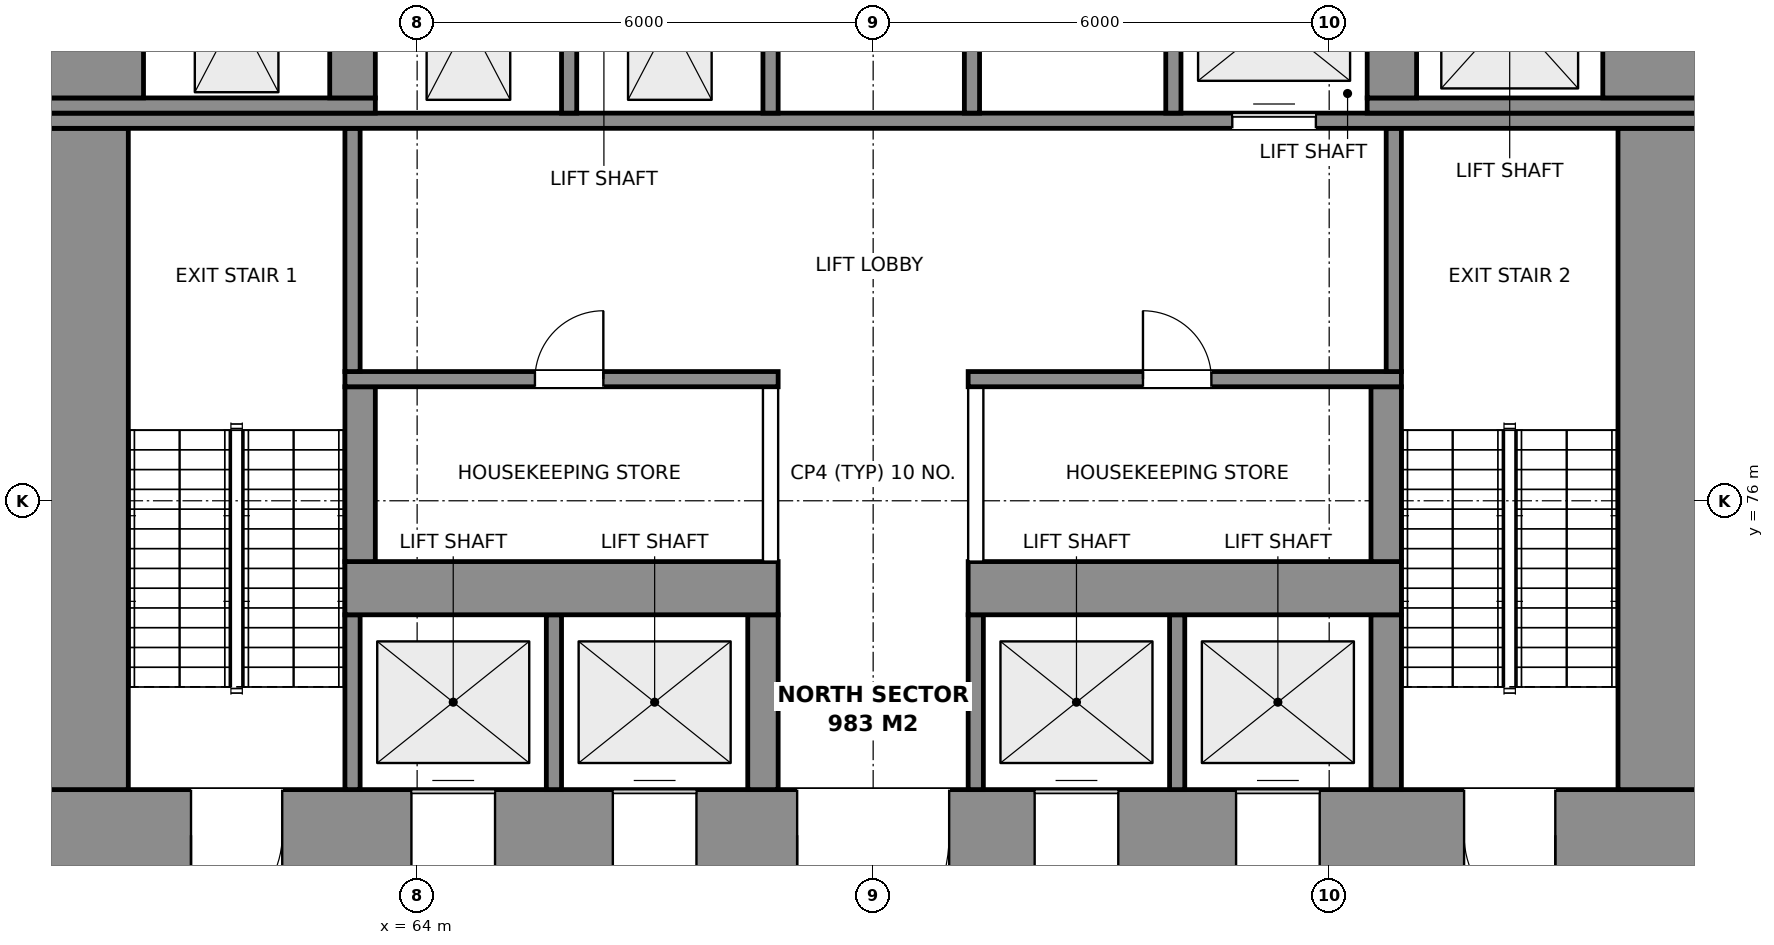
"""IFC4 building model, lengths in metres.
Left out: names, types, materials, properties, quantities, classifications, styles, units other than length and angle.
Written with IfcOpenShell. Run it as: python <this file> out.ifc"""

import sys

from ifc_helpers import new_model, si_unit, direction, frame, frame_2d, origin, place, context, subcontext, project, spatial, rectangle, extrude, element, fill, save


model = new_model("IFC4")
c1 = context("Model", 3, precision=1e-05, world=origin(), true_north=direction((0.0, 1.0)))
c2 = subcontext(c1, "Body", "Model", "MODEL_VIEW")
j1 = project(units=[si_unit("LENGTHUNIT", "METRE"), si_unit("PLANEANGLEUNIT", "RADIAN")], contexts=[c1])
p1 = place(None, origin())
s1 = spatial("IfcSite", under=j1, at=p1, CompositionType="ELEMENT")
p2 = place(p1, origin())
s2 = spatial("IfcBuilding", under=s1, at=p2, CompositionType="ELEMENT")
p3 = place(p2, frame((0.0, 0.0, 85.8)))
s3 = spatial("IfcBuildingStorey", under=s2, at=p3, CompositionType="ELEMENT", Elevation=85.8)
p4 = place(p3, frame((59.0, 71.6, 0.0), z_axis=(0.0, 0.0, 1.0), x_axis=(1.0, 0.0, 0.0)))
e1 = element("IfcWall", 1, at=p4, inside=s3, PredefinedType="SHEAR", context=c2, shape_type="SweptSolid", body=[
    extrude(rectangle(XDim=22.0, YDim=1.2, at=frame_2d((11.0, 0.0))), origin(), (0.0, 0.0, 1.0), 5.0),
])
p5 = place(p4, frame((2.025, 0.0, 0.0)))
e2 = element("IfcOpeningElement", 2, at=p5, cuts=e1, PredefinedType="OPENING", context=c2, shape_type="SweptSolid", body=[
    extrude(rectangle(XDim=1.2, YDim=2.1, at=frame_2d((0.6, 1.05))), frame((0.0, 0.61, 0.0), z_axis=(0.0, -1.0, 0.0), x_axis=(1.0, 0.0, 0.0)), (0.0, 0.0, 1.0), 1.22),
])
p6 = place(p4, frame((18.775, 0.0, 0.0)))
e3 = element("IfcOpeningElement", 3, at=p6, cuts=e1, PredefinedType="OPENING", context=c2, shape_type="SweptSolid", body=[
    extrude(rectangle(XDim=1.2, YDim=2.1, at=frame_2d((0.6, 1.05))), frame((0.0, 0.61, 0.0), z_axis=(0.0, -1.0, 0.0), x_axis=(1.0, 0.0, 0.0)), (0.0, 0.0, 1.0), 1.22),
])
p7 = place(p4, frame((10.0, 0.0, 0.0)))
e4 = element("IfcOpeningElement", 4, at=p7, cuts=e1, PredefinedType="OPENING", context=c2, shape_type="SweptSolid", body=[
    extrude(rectangle(XDim=2.0, YDim=2.1, at=frame_2d((1.0, 1.05))), frame((0.0, 0.61, 0.0), z_axis=(0.0, -1.0, 0.0), x_axis=(1.0, 0.0, 0.0)), (0.0, 0.0, 1.0), 1.22),
])
p8 = place(p4, frame((4.925, 0.0, 0.0)))
e5 = element("IfcOpeningElement", 5, at=p8, cuts=e1, PredefinedType="OPENING", context=c2, shape_type="SweptSolid", body=[
    extrude(rectangle(XDim=1.1, YDim=2.1, at=frame_2d((0.55, 1.05))), frame((0.0, 0.61, 0.0), z_axis=(0.0, -1.0, 0.0), x_axis=(1.0, 0.0, 0.0)), (0.0, 0.0, 1.0), 1.22),
])
p9 = place(p4, frame((7.575, 0.0, 0.0)))
e6 = element("IfcOpeningElement", 6, at=p9, cuts=e1, PredefinedType="OPENING", context=c2, shape_type="SweptSolid", body=[
    extrude(rectangle(XDim=1.1, YDim=2.1, at=frame_2d((0.55, 1.05))), frame((0.0, 0.61, 0.0), z_axis=(0.0, -1.0, 0.0), x_axis=(1.0, 0.0, 0.0)), (0.0, 0.0, 1.0), 1.22),
])
p10 = place(p4, frame((13.125, 0.0, 0.0)))
e7 = element("IfcOpeningElement", 7, at=p10, cuts=e1, PredefinedType="OPENING", context=c2, shape_type="SweptSolid", body=[
    extrude(rectangle(XDim=1.1, YDim=2.1, at=frame_2d((0.55, 1.05))), frame((0.0, 0.61, 0.0), z_axis=(0.0, -1.0, 0.0), x_axis=(1.0, 0.0, 0.0)), (0.0, 0.0, 1.0), 1.22),
])
p11 = place(p4, frame((15.775, 0.0, 0.0)))
e8 = element("IfcOpeningElement", 8, at=p11, cuts=e1, PredefinedType="OPENING", context=c2, shape_type="SweptSolid", body=[
    extrude(rectangle(XDim=1.1, YDim=2.1, at=frame_2d((0.55, 1.05))), frame((0.0, 0.61, 0.0), z_axis=(0.0, -1.0, 0.0), x_axis=(1.0, 0.0, 0.0)), (0.0, 0.0, 1.0), 1.22),
])
p12 = place(p3, frame((59.6, 72.2, 0.0), z_axis=(0.0, 0.0, 1.0), x_axis=(0.0, 1.0, 0.0)))
e9 = element("IfcWall", 9, at=p12, inside=s3, PredefinedType="SHEAR", context=c2, shape_type="SweptSolid", body=[
    extrude(rectangle(XDim=8.7, YDim=1.2, at=frame_2d((4.35, 0.0))), origin(), (0.0, 0.0, 1.0), 5.0),
])
for number, where, z_axis, x_axis in (
    (10, (63.15, 72.2, 0.0), (0.0, 0.0, 1.0), (0.0, 1.0, 0.0)),
    (11, (65.8, 72.2, 0.0), (0.0, 0.0, 1.0), (0.0, 1.0, 0.0)),
):
    element("IfcWall", number, at=place(p3, frame(where, z_axis=z_axis, x_axis=x_axis)), inside=s3, PredefinedType="SHEAR", context=c2, shape_type="SweptSolid", body=[
        extrude(rectangle(XDim=2.3, YDim=0.2, at=frame_2d((1.15, 0.0))), origin(), (0.0, 0.0, 1.0), 5.0),
    ])
p13 = place(p3, frame((68.55, 72.2, 0.0), z_axis=(0.0, 0.0, 1.0), x_axis=(0.0, 1.0, 0.0)))
e12 = element("IfcWall", 12, at=p13, inside=s3, PredefinedType="SHEAR", context=c2, shape_type="SweptSolid", body=[
    extrude(rectangle(XDim=2.3, YDim=0.4, at=frame_2d((1.15, 0.0))), origin(), (0.0, 0.0, 1.0), 5.0),
])
for number, where, z_axis, x_axis in (
    (13, (71.35, 72.2, 0.0), (0.0, 0.0, 1.0), (0.0, 1.0, 0.0)),
    (14, (74.0, 72.2, 0.0), (0.0, 0.0, 1.0), (0.0, 1.0, 0.0)),
):
    element("IfcWall", number, at=place(p3, frame(where, z_axis=z_axis, x_axis=x_axis)), inside=s3, PredefinedType="SHEAR", context=c2, shape_type="SweptSolid", body=[
        extrude(rectangle(XDim=2.3, YDim=0.2, at=frame_2d((1.15, 0.0))), origin(), (0.0, 0.0, 1.0), 5.0),
    ])
p14 = place(p3, frame((76.75, 72.2, 0.0), z_axis=(0.0, 0.0, 1.0), x_axis=(0.0, 1.0, 0.0)))
e15 = element("IfcWall", 15, at=p14, inside=s3, PredefinedType="SHEAR", context=c2, shape_type="SweptSolid", body=[
    extrude(rectangle(XDim=2.3, YDim=0.4, at=frame_2d((1.15, 0.0))), origin(), (0.0, 0.0, 1.0), 5.0),
])
p15 = place(p3, frame((80.4, 72.2, 0.0), z_axis=(0.0, 0.0, 1.0), x_axis=(0.0, 1.0, 0.0)))
e16 = element("IfcWall", 16, at=p15, inside=s3, PredefinedType="SHEAR", context=c2, shape_type="SweptSolid", body=[
    extrude(rectangle(XDim=8.7, YDim=1.2, at=frame_2d((4.35, 0.0))), origin(), (0.0, 0.0, 1.0), 5.0),
])
for number, where, z_axis, x_axis in (
    (17, (63.05, 74.85, 0.0), (0.0, 0.0, 1.0), (1.0, 0.0, 0.0)),
    (18, (71.25, 74.85, 0.0), (0.0, 0.0, 1.0), (1.0, 0.0, 0.0)),
):
    element("IfcWall", number, at=place(p3, frame(where, z_axis=z_axis, x_axis=x_axis)), inside=s3, PredefinedType="SHEAR", context=c2, shape_type="SweptSolid", body=[
        extrude(rectangle(XDim=5.7, YDim=0.7, at=frame_2d((2.85, 0.0))), origin(), (0.0, 0.0, 1.0), 5.0),
    ])
p16 = place(p3, frame((63.25, 75.2, 0.0), z_axis=(0.0, 0.0, 1.0), x_axis=(0.0, 1.0, 0.0)))
e19 = element("IfcWall", 19, at=p16, inside=s3, PredefinedType="SHEAR", context=c2, shape_type="SweptSolid", body=[
    extrude(rectangle(XDim=2.3, YDim=0.4, at=frame_2d((1.15, 0.0))), origin(), (0.0, 0.0, 1.0), 5.0),
])
for number, where, z_axis, x_axis in (
    (20, (68.65, 75.2, 0.0), (0.0, 0.0, 1.0), (0.0, 1.0, 0.0)),
    (21, (71.35, 75.2, 0.0), (0.0, 0.0, 1.0), (0.0, 1.0, 0.0)),
):
    element("IfcWall", number, at=place(p3, frame(where, z_axis=z_axis, x_axis=x_axis)), inside=s3, PredefinedType="PARTITIONING", context=c2, shape_type="SweptSolid", body=[
        extrude(rectangle(XDim=2.3, YDim=0.2, at=frame_2d((1.15, 0.0))), origin(), (0.0, 0.0, 1.0), 4.7),
    ])
p17 = place(p3, frame((76.75, 75.2, 0.0), z_axis=(0.0, 0.0, 1.0), x_axis=(0.0, 1.0, 0.0)))
e22 = element("IfcWall", 22, at=p17, inside=s3, PredefinedType="SHEAR", context=c2, shape_type="SweptSolid", body=[
    extrude(rectangle(XDim=2.3, YDim=0.4, at=frame_2d((1.15, 0.0))), origin(), (0.0, 0.0, 1.0), 5.0),
])
p18 = place(p3, frame((63.05, 77.6, 0.0), z_axis=(0.0, 0.0, 1.0), x_axis=(1.0, 0.0, 0.0)))
e23 = element("IfcWall", 23, at=p18, inside=s3, PredefinedType="SHEAR", context=c2, shape_type="SweptSolid", body=[
    extrude(rectangle(XDim=5.7, YDim=0.2, at=frame_2d((2.85, 0.0))), origin(), (0.0, 0.0, 1.0), 5.0),
])
p19 = place(p18, frame((2.5, 0.0, 0.0)))
e24 = element("IfcOpeningElement", 24, at=p19, cuts=e23, PredefinedType="OPENING", context=c2, shape_type="SweptSolid", body=[
    extrude(rectangle(XDim=0.9, YDim=2.1, at=frame_2d((0.45, 1.05))), frame((0.0, 0.11, 0.0), z_axis=(0.0, -1.0, 0.0), x_axis=(1.0, 0.0, 0.0)), (0.0, 0.0, 1.0), 0.22),
])
p20 = place(p3, frame((71.25, 77.6, 0.0), z_axis=(0.0, 0.0, 1.0), x_axis=(1.0, 0.0, 0.0)))
e25 = element("IfcWall", 25, at=p20, inside=s3, PredefinedType="SHEAR", context=c2, shape_type="SweptSolid", body=[
    extrude(rectangle(XDim=5.7, YDim=0.2, at=frame_2d((2.85, 0.0))), origin(), (0.0, 0.0, 1.0), 5.0),
])
p21 = place(p20, frame((2.3, 0.0, 0.0)))
e26 = element("IfcOpeningElement", 26, at=p21, cuts=e25, PredefinedType="OPENING", context=c2, shape_type="SweptSolid", body=[
    extrude(rectangle(XDim=0.9, YDim=2.1, at=frame_2d((0.45, 1.05))), frame((0.0, 0.11, 0.0), z_axis=(0.0, -1.0, 0.0), x_axis=(1.0, 0.0, 0.0)), (0.0, 0.0, 1.0), 0.22),
])
for number, where, z_axis, x_axis in (
    (27, (63.15, 77.7, 0.0), (0.0, 0.0, 1.0), (0.0, 1.0, 0.0)),
    (28, (76.85, 77.7, 0.0), (0.0, 0.0, 1.0), (0.0, 1.0, 0.0)),
):
    element("IfcWall", number, at=place(p3, frame(where, z_axis=z_axis, x_axis=x_axis)), inside=s3, PredefinedType="SHEAR", context=c2, shape_type="SweptSolid", body=[
        extrude(rectangle(XDim=3.2, YDim=0.2, at=frame_2d((1.6, 0.0))), origin(), (0.0, 0.0, 1.0), 5.0),
    ])
p22 = place(p3, frame((59.0, 81.0, 0.0), z_axis=(0.0, 0.0, 1.0), x_axis=(1.0, 0.0, 0.0)))
e29 = element("IfcWall", 29, at=p22, inside=s3, PredefinedType="SHEAR", context=c2, shape_type="SweptSolid", body=[
    extrude(rectangle(XDim=22.0, YDim=0.2, at=frame_2d((11.0, 0.0))), origin(), (0.0, 0.0, 1.0), 5.0),
])
p23 = place(p22, frame((15.725, 0.0, 0.0)))
e30 = element("IfcOpeningElement", 30, at=p23, cuts=e29, PredefinedType="OPENING", context=c2, shape_type="SweptSolid", body=[
    extrude(rectangle(XDim=1.1, YDim=2.1, at=frame_2d((0.55, 1.05))), frame((0.0, 0.11, 0.0), z_axis=(0.0, -1.0, 0.0), x_axis=(1.0, 0.0, 0.0)), (0.0, 0.0, 1.0), 0.22),
])
p24 = place(p3, frame((59.0, 81.2, 0.0), z_axis=(0.0, 0.0, 1.0), x_axis=(1.0, 0.0, 0.0)))
e31 = element("IfcWall", 31, at=p24, inside=s3, PredefinedType="SHEAR", context=c2, shape_type="SweptSolid", body=[
    extrude(rectangle(XDim=4.45, YDim=0.2, at=frame_2d((2.225, 0.0))), origin(), (0.0, 0.0, 1.0), 5.0),
])
for number, where, z_axis, x_axis in (
    (32, (66.0, 81.1, 0.0), (0.0, 0.0, 1.0), (0.0, 1.0, 0.0)),
    (33, (68.65, 81.1, 0.0), (0.0, 0.0, 1.0), (0.0, 1.0, 0.0)),
    (34, (71.3, 81.1, 0.0), (0.0, 0.0, 1.0), (0.0, 1.0, 0.0)),
    (35, (73.95, 81.1, 0.0), (0.0, 0.0, 1.0), (0.0, 1.0, 0.0)),
):
    element("IfcWall", number, at=place(p3, frame(where, z_axis=z_axis, x_axis=x_axis)), inside=s3, PredefinedType="SHEAR", context=c2, shape_type="SweptSolid", body=[
        extrude(rectangle(XDim=2.45, YDim=0.2, at=frame_2d((1.225, 0.0))), origin(), (0.0, 0.0, 1.0), 5.0),
    ])
p25 = place(p3, frame((76.5, 81.2, 0.0), z_axis=(0.0, 0.0, 1.0), x_axis=(1.0, 0.0, 0.0)))
e36 = element("IfcWall", 36, at=p25, inside=s3, PredefinedType="SHEAR", context=c2, shape_type="SweptSolid", body=[
    extrude(rectangle(XDim=4.5, YDim=0.2, at=frame_2d((2.25, 0.0))), origin(), (0.0, 0.0, 1.0), 5.0),
])
p26 = place(p3, frame((59.7, 81.3, 0.0), z_axis=(0.0, 0.0, 1.0), x_axis=(0.0, 1.0, 0.0)))
e37 = element("IfcWall", 37, at=p26, inside=s3, PredefinedType="SHEAR", context=c2, shape_type="SweptSolid", body=[
    extrude(rectangle(XDim=2.25, YDim=1.4, at=frame_2d((1.125, 0.0))), origin(), (0.0, 0.0, 1.0), 5.0),
])
p27 = place(p3, frame((63.15, 81.3, 0.0), z_axis=(0.0, 0.0, 1.0), x_axis=(0.0, 1.0, 0.0)))
e38 = element("IfcWall", 38, at=p27, inside=s3, PredefinedType="SHEAR", context=c2, shape_type="SweptSolid", body=[
    extrude(rectangle(XDim=2.25, YDim=0.6, at=frame_2d((1.125, 0.0))), origin(), (0.0, 0.0, 1.0), 5.0),
])
p28 = place(p3, frame((76.825, 81.3, 0.0), z_axis=(0.0, 0.0, 1.0), x_axis=(0.0, 1.0, 0.0)))
e39 = element("IfcWall", 39, at=p28, inside=s3, PredefinedType="SHEAR", context=c2, shape_type="SweptSolid", body=[
    extrude(rectangle(XDim=2.25, YDim=0.65, at=frame_2d((1.125, 0.0))), origin(), (0.0, 0.0, 1.0), 5.0),
])
p29 = place(p3, frame((80.3, 81.3, 0.0), z_axis=(0.0, 0.0, 1.0), x_axis=(0.0, 1.0, 0.0)))
e40 = element("IfcWall", 40, at=p29, inside=s3, PredefinedType="SHEAR", context=c2, shape_type="SweptSolid", body=[
    extrude(rectangle(XDim=2.25, YDim=1.4, at=frame_2d((1.125, 0.0))), origin(), (0.0, 0.0, 1.0), 5.0),
])
p30 = place(p5, frame((1.2, 0.0, 0.0), z_axis=(0.0, 0.0, 1.0), x_axis=(-1.0, 0.0, 0.0)))
e41 = element("IfcDoor", 41, at=p30, inside=s3, OperationType="SINGLE_SWING_RIGHT", PredefinedType="DOOR", context=c2, shape_type="SweptSolid", body=[
    extrude(rectangle(XDim=1.2, YDim=2.1, at=frame_2d((0.6, 1.05))), frame((0.0, 0.025, 0.0), z_axis=(0.0, -1.0, 0.0), x_axis=(1.0, 0.0, 0.0)), (0.0, 0.0, 1.0), 0.05),
])
fill(e2, e41)
p31 = place(p6, frame((1.2, 0.0, 0.0), z_axis=(0.0, 0.0, 1.0), x_axis=(-1.0, 0.0, 0.0)))
e42 = element("IfcDoor", 42, at=p31, inside=s3, OperationType="SINGLE_SWING_LEFT", PredefinedType="DOOR", context=c2, shape_type="SweptSolid", body=[
    extrude(rectangle(XDim=1.2, YDim=2.1, at=frame_2d((0.6, 1.05))), frame((0.0, 0.025, 0.0), z_axis=(0.0, -1.0, 0.0), x_axis=(1.0, 0.0, 0.0)), (0.0, 0.0, 1.0), 0.05),
])
fill(e3, e42)
p32 = place(p7, frame((2.0, 0.0, 0.0), z_axis=(0.0, 0.0, 1.0), x_axis=(-1.0, 0.0, 0.0)))
e43 = element("IfcDoor", 43, at=p32, inside=s3, OperationType="DOUBLE_DOOR_SINGLE_SWING", PredefinedType="DOOR", context=c2, shape_type="SweptSolid", body=[
    extrude(rectangle(XDim=2.0, YDim=2.1, at=frame_2d((1.0, 1.05))), frame((0.0, 0.025, 0.0), z_axis=(0.0, -1.0, 0.0), x_axis=(1.0, 0.0, 0.0)), (0.0, 0.0, 1.0), 0.05),
])
fill(e4, e43)
p33 = place(p23, origin())
e44 = element("IfcDoor", 44, at=p33, inside=s3, OperationType="DOUBLE_DOOR_SLIDING", PredefinedType="DOOR", context=c2, shape_type="SweptSolid", body=[
    extrude(rectangle(XDim=1.1, YDim=2.1, at=frame_2d((0.55, 1.05))), frame((0.0, 0.025, 0.0), z_axis=(0.0, -1.0, 0.0), x_axis=(1.0, 0.0, 0.0)), (0.0, 0.0, 1.0), 0.05),
])
fill(e30, e44)
p34 = place(p8, origin())
e45 = element("IfcDoor", 45, at=p34, inside=s3, OperationType="DOUBLE_DOOR_SLIDING", PredefinedType="DOOR", context=c2, shape_type="SweptSolid", body=[
    extrude(rectangle(XDim=1.1, YDim=2.1, at=frame_2d((0.55, 1.05))), frame((0.0, 0.025, 0.0), z_axis=(0.0, -1.0, 0.0), x_axis=(1.0, 0.0, 0.0)), (0.0, 0.0, 1.0), 0.05),
])
fill(e5, e45)
p35 = place(p9, origin())
e46 = element("IfcDoor", 46, at=p35, inside=s3, OperationType="DOUBLE_DOOR_SLIDING", PredefinedType="DOOR", context=c2, shape_type="SweptSolid", body=[
    extrude(rectangle(XDim=1.1, YDim=2.1, at=frame_2d((0.55, 1.05))), frame((0.0, 0.025, 0.0), z_axis=(0.0, -1.0, 0.0), x_axis=(1.0, 0.0, 0.0)), (0.0, 0.0, 1.0), 0.05),
])
fill(e6, e46)
p36 = place(p10, origin())
e47 = element("IfcDoor", 47, at=p36, inside=s3, OperationType="DOUBLE_DOOR_SLIDING", PredefinedType="DOOR", context=c2, shape_type="SweptSolid", body=[
    extrude(rectangle(XDim=1.1, YDim=2.1, at=frame_2d((0.55, 1.05))), frame((0.0, 0.025, 0.0), z_axis=(0.0, -1.0, 0.0), x_axis=(1.0, 0.0, 0.0)), (0.0, 0.0, 1.0), 0.05),
])
fill(e7, e47)
p37 = place(p11, origin())
e48 = element("IfcDoor", 48, at=p37, inside=s3, OperationType="DOUBLE_DOOR_SLIDING", PredefinedType="DOOR", context=c2, shape_type="SweptSolid", body=[
    extrude(rectangle(XDim=1.1, YDim=2.1, at=frame_2d((0.55, 1.05))), frame((0.0, 0.025, 0.0), z_axis=(0.0, -1.0, 0.0), x_axis=(1.0, 0.0, 0.0)), (0.0, 0.0, 1.0), 0.05),
])
fill(e8, e48)
p38 = place(p19, origin())
e49 = element("IfcDoor", 49, at=p38, inside=s3, OperationType="SINGLE_SWING_RIGHT", PredefinedType="DOOR", context=c2, shape_type="SweptSolid", body=[
    extrude(rectangle(XDim=0.9, YDim=2.1, at=frame_2d((0.45, 1.05))), frame((0.0, 0.025, 0.0), z_axis=(0.0, -1.0, 0.0), x_axis=(1.0, 0.0, 0.0)), (0.0, 0.0, 1.0), 0.05),
])
fill(e24, e49)
p39 = place(p21, origin())
e50 = element("IfcDoor", 50, at=p39, inside=s3, OperationType="SINGLE_SWING_LEFT", PredefinedType="DOOR", context=c2, shape_type="SweptSolid", body=[
    extrude(rectangle(XDim=0.9, YDim=2.1, at=frame_2d((0.45, 1.05))), frame((0.0, 0.025, 0.0), z_axis=(0.0, -1.0, 0.0), x_axis=(1.0, 0.0, 0.0)), (0.0, 0.0, 1.0), 0.05),
])
fill(e26, e50)
save(model, sys.argv[1])
